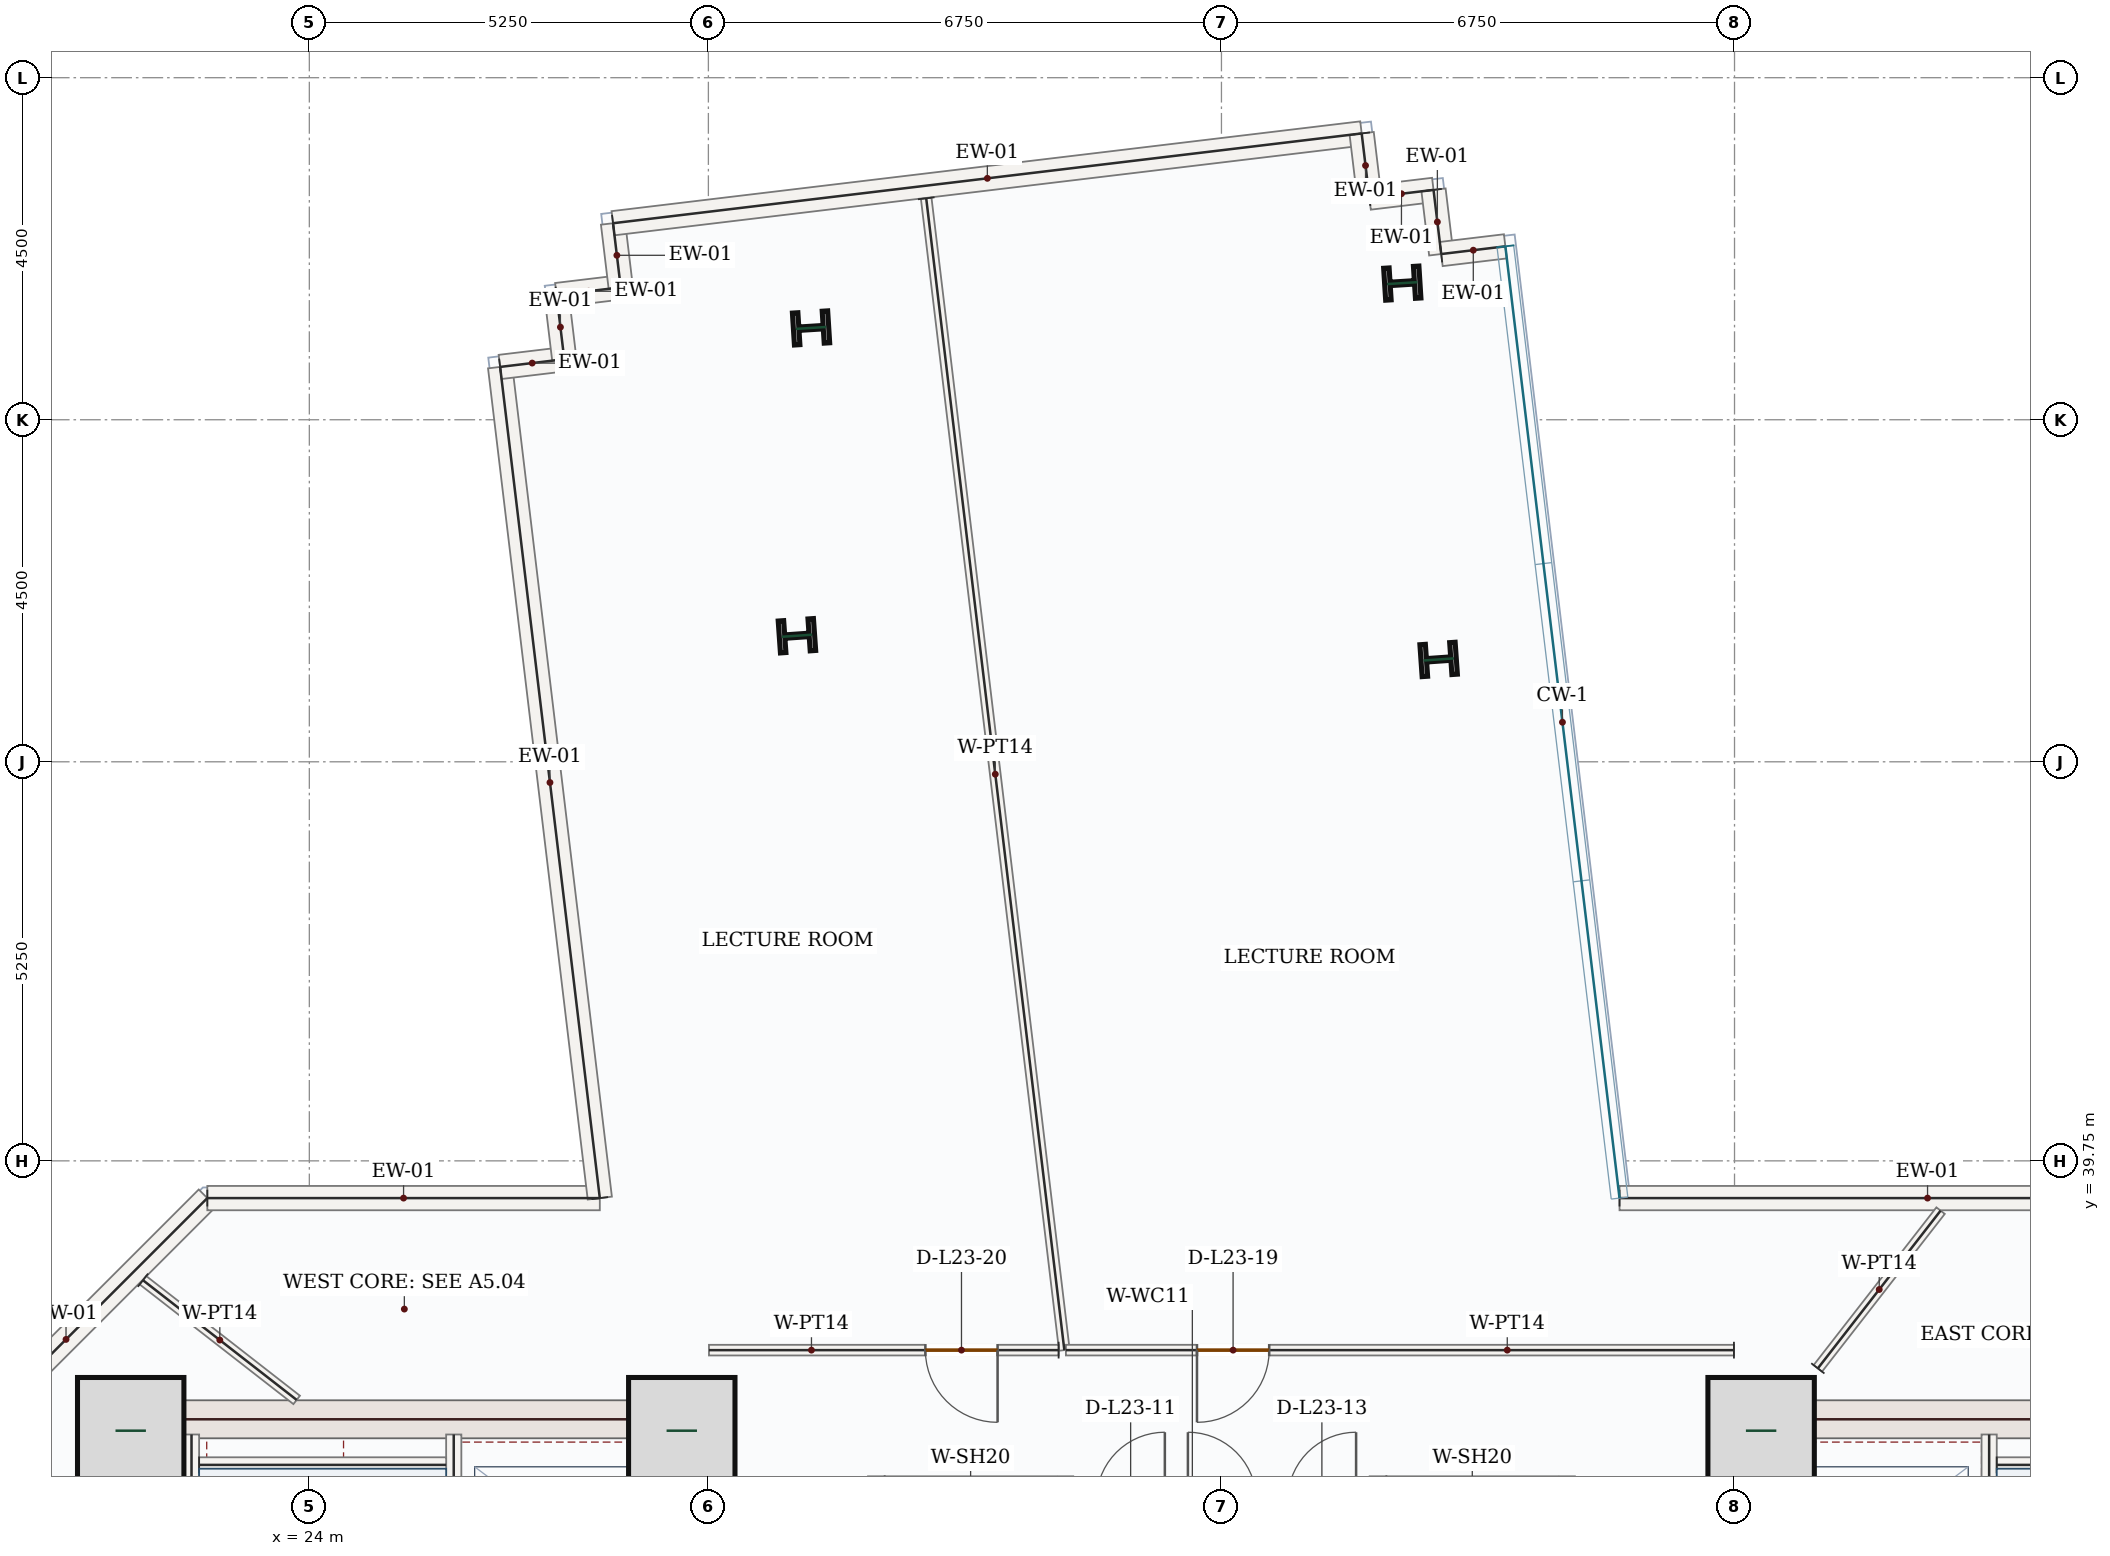
"""IFC4 building model, lengths in metres.
Left out: names, types, materials, properties, quantities, classifications, styles, units other than length and angle.
Written with IfcOpenShell. Run it as: python <this file> out.ifc"""

import sys

from ifc_helpers import new_model, si_unit, direction, frame, frame_2d, origin, origin_2d, place, context, subcontext, project, spatial, rectangle, i_section, extrude, source, transform, mapped, element, fill, save


model = new_model("IFC4")
c1 = context("Model", 3, precision=1e-05, world=origin(), true_north=direction((0.0, 1.0)))
c2 = subcontext(c1, "Body", "Model", "MODEL_VIEW")
j1 = project(units=[si_unit("LENGTHUNIT", "METRE"), si_unit("PLANEANGLEUNIT", "RADIAN")], contexts=[c1])
p1 = place(None, origin())
s1 = spatial("IfcSite", under=j1, at=p1, CompositionType="ELEMENT")
p2 = place(p1, origin())
s2 = spatial("IfcBuilding", under=s1, at=p2, CompositionType="ELEMENT")
p3 = place(p2, frame((0.0, 0.0, 104.7)))
s3 = spatial("IfcBuildingStorey", under=s2, at=p3, CompositionType="ELEMENT", Elevation=104.7)
m1 = source(origin(), c2, "Body", "SweptSolid", [
    extrude(rectangle(XDim=8.55, YDim=0.5, at=frame_2d((4.275, 0.0))), origin(), (0.0, 0.0, 1.0), 3.95),
])
p4 = place(p3, frame((21.5, 28.05, 0.0), z_axis=(0.0, 0.0, 1.0), x_axis=(0.0, 1.0, 0.0)))
e1 = element("IfcWall", 1, at=p4, inside=s3, PredefinedType="SHEAR", context=c2, shape_type="MappedRepresentation", body=[
    mapped(m1, transform((0.0, 0.0, 0.0), x_axis=(1.0, 0.0, 0.0), y_axis=(0.0, 1.0, 0.0), z_axis=(0.0, 0.0, 1.0), scale=1.0)),
])
p5 = place(p3, frame((29.0, 28.05, 0.0), z_axis=(0.0, 0.0, 1.0), x_axis=(0.0, 1.0, 0.0)))
e2 = element("IfcWall", 2, at=p5, inside=s3, PredefinedType="SHEAR", context=c2, shape_type="SweptSolid", body=[
    extrude(rectangle(XDim=8.55, YDim=0.5, at=frame_2d((4.275, 0.0))), origin(), (0.0, 0.0, 1.0), 3.95),
])
p6 = place(p5, frame((1.5, 0.0, 0.0)))
e3 = element("IfcOpeningElement", 3, at=p6, cuts=e2, PredefinedType="OPENING", context=c2, shape_type="SweptSolid", body=[
    extrude(rectangle(XDim=1.1, YDim=2.2, at=frame_2d((0.55, 1.1))), frame((0.0, 0.26, 0.0), z_axis=(0.0, -1.0, 0.0), x_axis=(1.0, 0.0, 0.0)), (0.0, 0.0, 1.0), 0.52),
])
m2 = source(origin(), c2, "Body", "SweptSolid", [
    extrude(rectangle(XDim=7.0, YDim=0.5, at=frame_2d((3.5, 0.0))), origin(), (0.0, 0.0, 1.0), 3.95),
])
p7 = place(p3, frame((21.75, 36.35, 0.0), z_axis=(0.0, 0.0, 1.0), x_axis=(1.0, 0.0, 0.0)))
e4 = element("IfcWall", 4, at=p7, inside=s3, PredefinedType="SHEAR", context=c2, shape_type="MappedRepresentation", body=[
    mapped(m2, transform((0.0, 0.0, 0.0), x_axis=(1.0, 0.0, 0.0), y_axis=(0.0, 1.0, 0.0), z_axis=(0.0, 0.0, 1.0), scale=1.0)),
])
p8 = place(p3, frame((43.0, 28.05, 0.0), z_axis=(0.0, 0.0, 1.0), x_axis=(0.0, 1.0, 0.0)))
e5 = element("IfcWall", 5, at=p8, inside=s3, PredefinedType="SHEAR", context=c2, shape_type="SweptSolid", body=[
    extrude(rectangle(XDim=8.55, YDim=0.5, at=frame_2d((4.275, 0.0))), origin(), (0.0, 0.0, 1.0), 3.95),
])
p9 = place(p8, frame((1.5, 0.0, 0.0)))
e6 = element("IfcOpeningElement", 6, at=p9, cuts=e5, PredefinedType="OPENING", context=c2, shape_type="SweptSolid", body=[
    extrude(rectangle(XDim=1.1, YDim=2.2, at=frame_2d((0.55, 1.1))), frame((0.0, 0.26, 0.0), z_axis=(0.0, -1.0, 0.0), x_axis=(1.0, 0.0, 0.0)), (0.0, 0.0, 1.0), 0.52),
])
p10 = place(p3, frame((43.25, 36.35, 0.0), z_axis=(0.0, 0.0, 1.0), x_axis=(1.0, 0.0, 0.0)))
e7 = element("IfcWall", 7, at=p10, inside=s3, PredefinedType="SHEAR", context=c2, shape_type="MappedRepresentation", body=[
    mapped(m2, transform((0.0, 0.0, 0.0), x_axis=(1.0, 0.0, 0.0), y_axis=(0.0, 1.0, 0.0), z_axis=(0.0, 0.0, 1.0), scale=1.0)),
])
m3 = source(origin(), c2, "Body", "SweptSolid", [
    extrude(rectangle(XDim=1.4, YDim=1.4, at=origin_2d()), origin(), (0.0, 0.0, 1.0), 4.2),
])
for number, where, z_axis, x_axis in (
    (8, (21.65, 36.2, 0.0), (0.0, 0.0, 1.0), (1.0, 0.0, 0.0)),
    (9, (28.9, 36.2, 0.0), (0.0, 0.0, 1.0), (1.0, 0.0, 0.0)),
    (10, (43.1, 36.2, 0.0), (0.0, 0.0, 1.0), (1.0, 0.0, 0.0)),
):
    element("IfcColumn", number, at=place(p3, frame(where, z_axis=z_axis, x_axis=x_axis)), inside=s3, PredefinedType="COLUMN", context=c2, shape_type="MappedRepresentation", body=[
        mapped(m3, transform((0.0, 0.0, 0.0), x_axis=(1.0, 0.0, 0.0), y_axis=(0.0, 1.0, 0.0), z_axis=(0.0, 0.0, 1.0), scale=1.0)),
    ])
m4 = source(origin(), c2, "Body", "SweptSolid", [
    extrude(i_section(OverallWidth=0.421, OverallDepth=0.465, WebThickness=0.045, FlangeThickness=0.073, FilletRadius=0.018, at=origin_2d()), origin(), (0.0, 0.0, 1.0), 4.2),
])
for number, where, z_axis, x_axis in (
    (11, (38.857, 46.346, 0.0), (0.0, 0.0, 1.0), (-0.07, 0.998, 0.0)),
    (12, (30.415, 46.658, 0.0), (0.0, 0.0, 1.0), (-0.07, 0.998, 0.0)),
    (13, (38.379, 51.297, 0.0), (0.0, 0.0, 1.0), (-0.063, 0.998, 0.0)),
    (14, (30.601, 50.708, 0.0), (0.0, 0.0, 1.0), (-0.063, 0.998, 0.0)),
):
    element("IfcColumn", number, at=place(p3, frame(where, z_axis=z_axis, x_axis=x_axis)), inside=s3, PredefinedType="COLUMN", context=c2, shape_type="MappedRepresentation", body=[
        mapped(m4, transform((0.0, 0.0, 0.0), x_axis=(1.0, 0.0, 0.0), y_axis=(0.0, 1.0, 0.0), z_axis=(0.0, 0.0, 1.0), scale=1.0)),
    ])
m5 = source(origin(), c2, "Body", "SweptSolid", [
    extrude(rectangle(XDim=5.258, YDim=0.32, at=frame_2d((2.629, 0.0))), origin(), (0.0, 0.0, 1.0), 3.95),
])
p11 = place(p3, frame((18.94, 35.542, 0.0), z_axis=(0.0, 0.0, 1.0), x_axis=(0.707106781187, 0.707106781187, 0.0)))
e15 = element("IfcWall", 15, at=p11, inside=s3, PredefinedType="SOLIDWALL", context=c2, shape_type="MappedRepresentation", body=[
    mapped(m5, transform((0.0, 0.0, 0.0), x_axis=(1.0, 0.0, 0.0), y_axis=(0.0, 1.0, 0.0), z_axis=(0.0, 0.0, 1.0), scale=1.0)),
])
m6 = source(origin(), c2, "Body", "SweptSolid", [
    extrude(rectangle(XDim=5.164, YDim=0.32, at=frame_2d((2.582, 0.0))), origin(), (0.0, 0.0, 1.0), 3.95),
])
p12 = place(p3, frame((22.658, 39.26, 0.0), z_axis=(0.0, 0.0, 1.0), x_axis=(1.0, 0.0, 0.0)))
e16 = element("IfcWall", 16, at=p12, inside=s3, PredefinedType="SOLIDWALL", context=c2, shape_type="MappedRepresentation", body=[
    mapped(m6, transform((0.0, 0.0, 0.0), x_axis=(1.0, 0.0, 0.0), y_axis=(0.0, 1.0, 0.0), z_axis=(0.0, 0.0, 1.0), scale=1.0)),
])
m7 = source(origin(), c2, "Body", "SweptSolid", [
    extrude(rectangle(XDim=11.013, YDim=0.32, at=frame_2d((5.507, 0.0))), origin(), (0.0, 0.0, 1.0), 3.95),
])
p13 = place(p3, frame((27.822, 39.26, 0.0), z_axis=(0.0, 0.0, 1.0), x_axis=(-0.119086653457, 0.992883864794, 0.0)))
e17 = element("IfcWall", 17, at=p13, inside=s3, PredefinedType="SOLIDWALL", context=c2, shape_type="MappedRepresentation", body=[
    mapped(m7, transform((0.0, 0.0, 0.0), x_axis=(1.0, 0.0, 0.0), y_axis=(0.0, 1.0, 0.0), z_axis=(0.0, 0.0, 1.0), scale=1.0)),
])
m8 = source(origin(), c2, "Body", "SweptSolid", [
    extrude(rectangle(XDim=0.85, YDim=0.32, at=frame_2d((0.425, 0.0))), origin(), (0.0, 0.0, 1.0), 3.95),
])
for number, where, z_axis, x_axis in (
    (18, (26.51, 50.195, 0.0), (0.0, 0.0, 1.0), (0.993, 0.119, 0.0)),
    (19, (27.354, 50.296, 0.0), (0.0, 0.0, 1.0), (-0.119, 0.993, 0.0)),
    (20, (27.253, 51.14, 0.0), (0.0, 0.0, 1.0), (0.993, 0.119, 0.0)),
    (21, (28.097, 51.241, 0.0), (0.0, 0.0, 1.0), (-0.119, 0.993, 0.0)),
):
    element("IfcWall", number, at=place(p3, frame(where, z_axis=z_axis, x_axis=x_axis)), inside=s3, PredefinedType="SOLIDWALL", context=c2, shape_type="MappedRepresentation", body=[
        mapped(m8, transform((0.0, 0.0, 0.0), x_axis=(1.0, 0.0, 0.0), y_axis=(0.0, 1.0, 0.0), z_axis=(0.0, 0.0, 1.0), scale=1.0)),
    ])
m9 = source(origin(), c2, "Body", "SweptSolid", [
    extrude(rectangle(XDim=9.92, YDim=0.32, at=frame_2d((4.96, 0.0))), origin(), (0.0, 0.0, 1.0), 3.95),
])
p14 = place(p3, frame((27.996, 52.085, 0.0), z_axis=(0.0, 0.0, 1.0), x_axis=(0.992883125729, 0.119092815244, 0.0)))
e22 = element("IfcWall", 22, at=p14, inside=s3, PredefinedType="SOLIDWALL", context=c2, shape_type="MappedRepresentation", body=[
    mapped(m9, transform((0.0, 0.0, 0.0), x_axis=(1.0, 0.0, 0.0), y_axis=(0.0, 1.0, 0.0), z_axis=(0.0, 0.0, 1.0), scale=1.0)),
])
for number, where, z_axis, x_axis in (
    (23, (37.845, 53.267, 0.0), (0.0, 0.0, 1.0), (0.119, -0.993, 0.0)),
    (24, (37.946, 52.423, 0.0), (0.0, 0.0, 1.0), (0.993, 0.119, 0.0)),
    (25, (38.79, 52.524, 0.0), (0.0, 0.0, 1.0), (0.119, -0.993, 0.0)),
):
    element("IfcWall", number, at=place(p3, frame(where, z_axis=z_axis, x_axis=x_axis)), inside=s3, PredefinedType="SOLIDWALL", context=c2, shape_type="MappedRepresentation", body=[
        mapped(m8, transform((0.0, 0.0, 0.0), x_axis=(1.0, 0.0, 0.0), y_axis=(0.0, 1.0, 0.0), z_axis=(0.0, 0.0, 1.0), scale=1.0)),
    ])
m10 = source(origin(), c2, "Body", "SweptSolid", [
    extrude(rectangle(XDim=0.85, YDim=0.32, at=frame_2d((0.425, 0.0))), origin(), (0.0, 0.0, 1.0), 3.95),
])
p15 = place(p3, frame((38.891, 51.68, 0.0), z_axis=(0.0, 0.0, 1.0), x_axis=(0.992867319472, 0.119224518976, 0.0)))
e26 = element("IfcWall", 26, at=p15, inside=s3, PredefinedType="SOLIDWALL", context=c2, shape_type="MappedRepresentation", body=[
    mapped(m10, transform((0.0, 0.0, 0.0), x_axis=(1.0, 0.0, 0.0), y_axis=(0.0, 1.0, 0.0), z_axis=(0.0, 0.0, 1.0), scale=1.0)),
])
m11 = source(origin(), c2, "Body", "SweptSolid", [
    extrude(rectangle(XDim=8.105, YDim=0.32, at=frame_2d((4.052, 0.0))), origin(), (0.0, 0.0, 1.0), 3.95),
])
p16 = place(p3, frame((41.237, 39.26, 0.0), z_axis=(0.0, 0.0, 1.0), x_axis=(1.0, 0.0, 0.0)))
e27 = element("IfcWall", 27, at=p16, inside=s3, PredefinedType="SOLIDWALL", context=c2, shape_type="MappedRepresentation", body=[
    mapped(m11, transform((0.0, 0.0, 0.0), x_axis=(1.0, 0.0, 0.0), y_axis=(0.0, 1.0, 0.0), z_axis=(0.0, 0.0, 1.0), scale=1.0)),
])
m12 = source(origin(), c2, "Body", "SweptSolid", [
    extrude(rectangle(XDim=7.87, YDim=0.2, at=frame_2d((3.935, 0.0))), origin(), (0.0, 0.0, 1.0), 3.95),
])
p17 = place(p3, frame((22.45, 28.28, 0.0), z_axis=(0.0, 0.0, 1.0), x_axis=(0.0, 1.0, 0.0)))
e28 = element("IfcWall", 28, at=p17, inside=s3, PredefinedType="SOLIDWALL", context=c2, shape_type="MappedRepresentation", body=[
    mapped(m12, transform((0.0, 0.0, 0.0), x_axis=(1.0, 0.0, 0.0), y_axis=(0.0, 1.0, 0.0), z_axis=(0.0, 0.0, 1.0), scale=1.0)),
])
p18 = place(p3, frame((25.9, 28.15, 0.0), z_axis=(0.0, 0.0, 1.0), x_axis=(0.0, 1.0, 0.0)))
e29 = element("IfcWall", 29, at=p18, inside=s3, PredefinedType="SOLIDWALL", context=c2, shape_type="SweptSolid", body=[
    extrude(rectangle(XDim=8.0, YDim=0.2, at=frame_2d((4.0, 0.0))), origin(), (0.0, 0.0, 1.0), 3.95),
])
p19 = place(p18, frame((0.4, 0.0, 0.0)))
e30 = element("IfcOpeningElement", 30, at=p19, cuts=e29, PredefinedType="OPENING", context=c2, shape_type="SweptSolid", body=[
    extrude(rectangle(XDim=1.05, YDim=2.15, at=frame_2d((0.525, 1.075))), frame((0.0, 0.11, 0.0), z_axis=(0.0, -1.0, 0.0), x_axis=(1.0, 0.0, 0.0)), (0.0, 0.0, 1.0), 0.22),
])
p20 = place(p3, frame((46.1, 28.15, 0.0), z_axis=(0.0, 0.0, 1.0), x_axis=(0.0, 1.0, 0.0)))
e31 = element("IfcWall", 31, at=p20, inside=s3, PredefinedType="SOLIDWALL", context=c2, shape_type="SweptSolid", body=[
    extrude(rectangle(XDim=8.0, YDim=0.2, at=frame_2d((4.0, 0.0))), origin(), (0.0, 0.0, 1.0), 3.95),
])
p21 = place(p20, frame((0.4, 0.0, 0.0)))
e32 = element("IfcOpeningElement", 32, at=p21, cuts=e31, PredefinedType="OPENING", context=c2, shape_type="SweptSolid", body=[
    extrude(rectangle(XDim=1.05, YDim=2.15, at=frame_2d((0.525, 1.075))), frame((0.0, 0.11, 0.0), z_axis=(0.0, -1.0, 0.0), x_axis=(1.0, 0.0, 0.0)), (0.0, 0.0, 1.0), 0.22),
])
m13 = source(origin(), c2, "Body", "SweptSolid", [
    extrude(rectangle(XDim=3.25, YDim=0.2, at=frame_2d((1.625, 0.0))), origin(), (0.0, 0.0, 1.0), 3.95),
])
for number, where, z_axis, x_axis in (
    (33, (22.55, 35.75, 0.0), (0.0, 0.0, 1.0), (1.0, 0.0, 0.0)),
    (34, (46.2, 35.75, 0.0), (0.0, 0.0, 1.0), (1.0, 0.0, 0.0)),
):
    element("IfcWall", number, at=place(p3, frame(where, z_axis=z_axis, x_axis=x_axis)), inside=s3, PredefinedType="SOLIDWALL", context=c2, shape_type="MappedRepresentation", body=[
        mapped(m13, transform((0.0, 0.0, 0.0), x_axis=(1.0, 0.0, 0.0), y_axis=(0.0, 1.0, 0.0), z_axis=(0.0, 0.0, 1.0), scale=1.0)),
    ])
m14 = source(origin(), c2, "Body", "SweptSolid", [
    extrude(rectangle(XDim=2.4, YDim=0.2, at=frame_2d((1.2, 0.0))), origin(), (0.0, 0.0, 1.0), 3.95),
])
for number, where, z_axis, x_axis in (
    (35, (31.45, 33.2, 0.0), (0.0, 0.0, 1.0), (0.0, 1.0, 0.0)),
    (36, (33.95, 33.2, 0.0), (0.0, 0.0, 1.0), (0.0, 1.0, 0.0)),
    (37, (38.05, 33.2, 0.0), (0.0, 0.0, 1.0), (0.0, 1.0, 0.0)),
    (38, (40.55, 33.2, 0.0), (0.0, 0.0, 1.0), (0.0, 1.0, 0.0)),
):
    element("IfcWall", number, at=place(p3, frame(where, z_axis=z_axis, x_axis=x_axis)), inside=s3, PredefinedType="SOLIDWALL", context=c2, shape_type="MappedRepresentation", body=[
        mapped(m14, transform((0.0, 0.0, 0.0), x_axis=(1.0, 0.0, 0.0), y_axis=(0.0, 1.0, 0.0), z_axis=(0.0, 0.0, 1.0), scale=1.0)),
    ])
m15 = source(origin(), c2, "Body", "SweptSolid", [
    extrude(rectangle(XDim=2.563, YDim=0.14, at=frame_2d((1.282, 0.0))), origin(), (0.0, 0.0, 1.0), 3.95),
])
p22 = place(p3, frame((21.811, 38.18, 0.0), z_axis=(0.0, 0.0, 1.0), x_axis=(0.789034129839, -0.614349364734, 0.0)))
e39 = element("IfcWall", 39, at=p22, inside=s3, PredefinedType="PARTITIONING", context=c2, shape_type="MappedRepresentation", body=[
    mapped(m15, transform((0.0, 0.0, 0.0), x_axis=(1.0, 0.0, 0.0), y_axis=(0.0, 1.0, 0.0), z_axis=(0.0, 0.0, 1.0), scale=1.0)),
])
m16 = source(origin(), c2, "Body", "SweptSolid", [
    extrude(rectangle(XDim=2.629, YDim=0.14, at=frame_2d((1.315, 0.0))), origin(), (0.0, 0.0, 1.0), 3.95),
])
p23 = place(p3, frame((43.846, 37.02, 0.0), z_axis=(0.0, 0.0, 1.0), x_axis=(0.614210560268, 0.789142184689, 0.0)))
e40 = element("IfcWall", 40, at=p23, inside=s3, PredefinedType="PARTITIONING", context=c2, shape_type="MappedRepresentation", body=[
    mapped(m16, transform((0.0, 0.0, 0.0), x_axis=(1.0, 0.0, 0.0), y_axis=(0.0, 1.0, 0.0), z_axis=(0.0, 0.0, 1.0), scale=1.0)),
])
m17 = source(origin(), c2, "Body", "SweptSolid", [
    extrude(rectangle(XDim=15.262, YDim=0.14, at=frame_2d((7.631, 0.0))), origin(), (0.0, 0.0, 1.0), 3.95),
])
p24 = place(p3, frame((32.116, 52.413, 0.0), z_axis=(0.0, 0.0, 1.0), x_axis=(0.119095388495, -0.992882817073, 0.0)))
e41 = element("IfcWall", 41, at=p24, inside=s3, PredefinedType="PARTITIONING", context=c2, shape_type="MappedRepresentation", body=[
    mapped(m17, transform((0.0, 0.0, 0.0), x_axis=(1.0, 0.0, 0.0), y_axis=(0.0, 1.0, 0.0), z_axis=(0.0, 0.0, 1.0), scale=1.0)),
])
p25 = place(p3, frame((33.858, 37.26, 0.0), z_axis=(0.0, 0.0, 1.0), x_axis=(-0.999999998592, -5.3070106e-05, 0.0)))
e42 = element("IfcWall", 42, at=p25, inside=s3, PredefinedType="PARTITIONING", context=c2, shape_type="SweptSolid", body=[
    extrude(rectangle(XDim=4.6, YDim=0.14, at=frame_2d((2.3, 0.0))), origin(), (0.0, 0.0, 1.0), 3.95),
])
p26 = place(p25, frame((0.803, 0.0, 0.0)))
e43 = element("IfcOpeningElement", 43, at=p26, cuts=e42, PredefinedType="OPENING", context=c2, shape_type="SweptSolid", body=[
    extrude(rectangle(XDim=0.95, YDim=2.15, at=frame_2d((0.475, 1.075))), frame((0.0, 0.08, 0.0), z_axis=(0.0, -1.0, 0.0), x_axis=(1.0, 0.0, 0.0)), (0.0, 0.0, 1.0), 0.16),
])
p27 = place(p3, frame((42.742, 37.26, 0.0), z_axis=(0.0, 0.0, 1.0), x_axis=(-0.999999999614, 2.7778549e-05, 0.0)))
e44 = element("IfcWall", 44, at=p27, inside=s3, PredefinedType="PARTITIONING", context=c2, shape_type="SweptSolid", body=[
    extrude(rectangle(XDim=8.789, YDim=0.14, at=frame_2d((4.395, 0.0))), origin(), (0.0, 0.0, 1.0), 3.95),
])
p28 = place(p27, frame((6.114, 0.0, 0.0)))
e45 = element("IfcOpeningElement", 45, at=p28, cuts=e44, PredefinedType="OPENING", context=c2, shape_type="SweptSolid", body=[
    extrude(rectangle(XDim=0.95, YDim=2.15, at=frame_2d((0.475, 1.075))), frame((0.0, 0.08, 0.0), z_axis=(0.0, -1.0, 0.0), x_axis=(1.0, 0.0, 0.0)), (0.0, 0.0, 1.0), 0.16),
])
m18 = source(origin(), c2, "Body", "SweptSolid", [
    extrude(rectangle(XDim=0.95, YDim=2.15, at=frame_2d((0.475, 1.075))), frame((0.0, 0.025, 0.0), z_axis=(0.0, -1.0, 0.0), x_axis=(1.0, 0.0, 0.0)), (0.0, 0.0, 1.0), 0.05),
])
p29 = place(p28, origin())
e46 = element("IfcDoor", 46, at=p29, inside=s3, OperationType="SINGLE_SWING_RIGHT", PredefinedType="DOOR", context=c2, shape_type="MappedRepresentation", body=[
    mapped(m18, transform((0.0, 0.0, 0.0), x_axis=(1.0, 0.0, 0.0), y_axis=(0.0, 1.0, 0.0), z_axis=(0.0, 0.0, 1.0), scale=1.0)),
])
fill(e45, e46)
p30 = place(p26, origin())
e47 = element("IfcDoor", 47, at=p30, inside=s3, OperationType="SINGLE_SWING_LEFT", PredefinedType="DOOR", context=c2, shape_type="MappedRepresentation", body=[
    mapped(m18, transform((0.0, 0.0, 0.0), x_axis=(1.0, 0.0, 0.0), y_axis=(0.0, 1.0, 0.0), z_axis=(0.0, 0.0, 1.0), scale=1.0)),
])
fill(e43, e47)
save(model, sys.argv[1])
